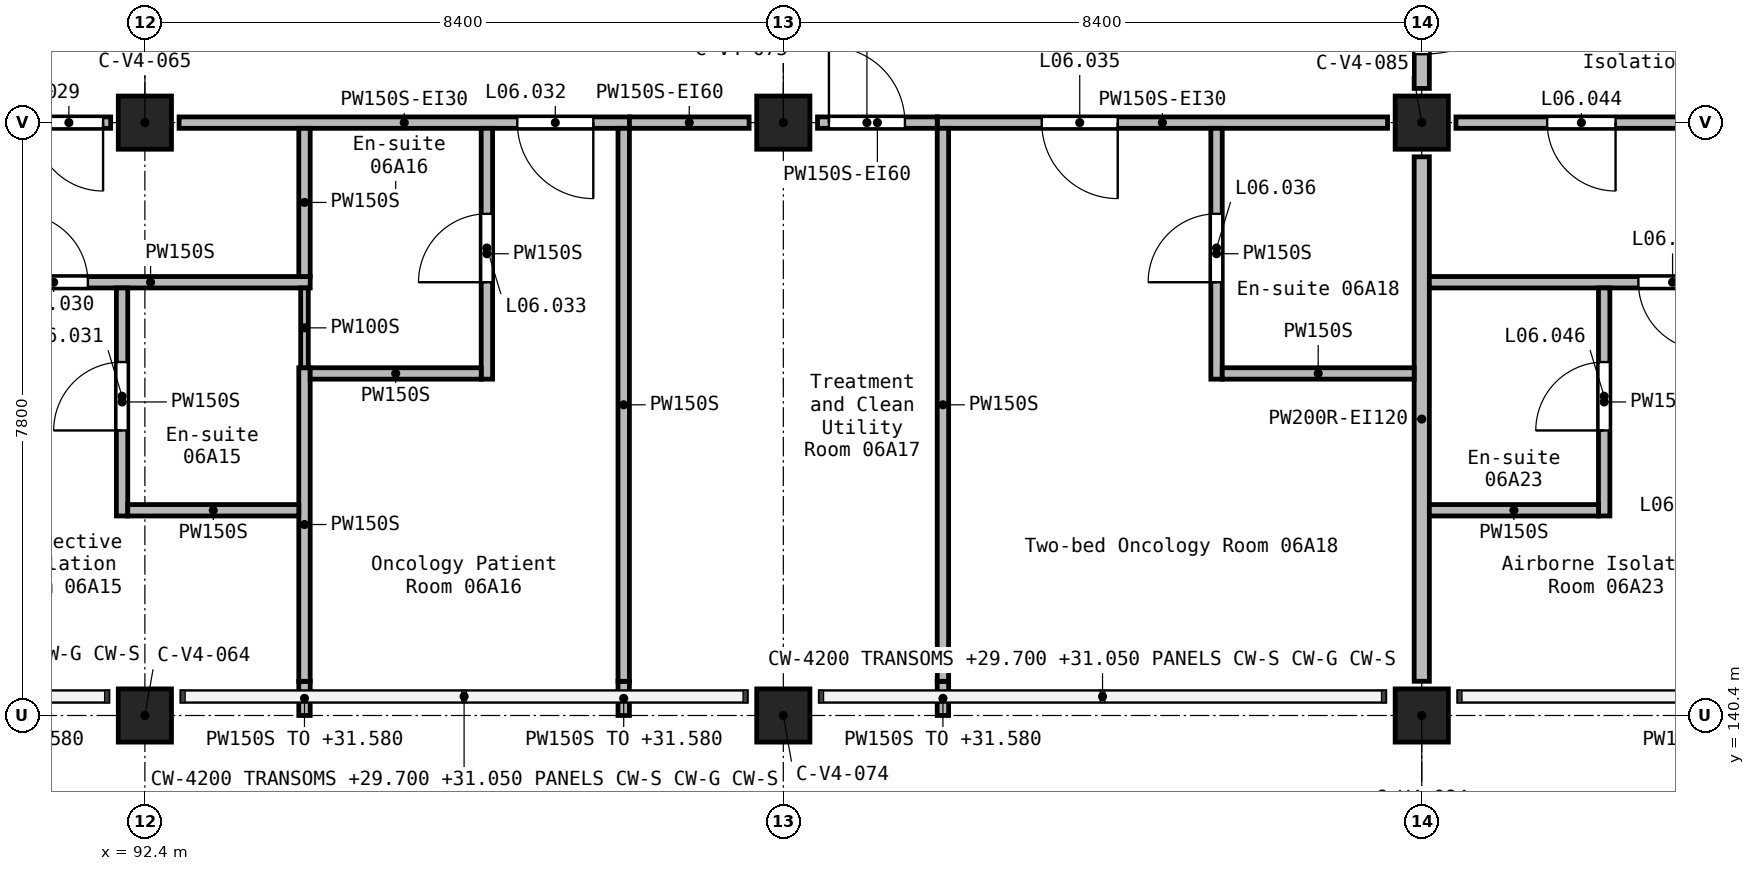
"""IFC4 building model, lengths in metres.
Left out: names, types, materials, properties, quantities, classifications, styles, units other than length and angle.
Written with IfcOpenShell. Run it as: python <this file> out.ifc"""

import sys

from ifc_helpers import new_model, si_unit, direction, frame, frame_2d, origin, origin_2d, place, context, subcontext, project, spatial, rectangle, extrude, element, fill, save


model = new_model("IFC4")
c1 = context("Model", 3, precision=1e-05, world=origin(), true_north=direction((0.0, 1.0)))
c2 = subcontext(c1, "Body", "Model", "MODEL_VIEW")
j1 = project(units=[si_unit("LENGTHUNIT", "METRE"), si_unit("PLANEANGLEUNIT", "RADIAN")], contexts=[c1])
p1 = place(None, origin())
s1 = spatial("IfcSite", under=j1, at=p1, CompositionType="ELEMENT")
p2 = place(p1, origin())
s2 = spatial("IfcBuilding", under=s1, at=p2, CompositionType="ELEMENT")
p3 = place(p2, frame((0.0, 0.0, 28.8)))
s3 = spatial("IfcBuildingStorey", under=s2, at=p3, CompositionType="ELEMENT", Elevation=28.8)
for number, where, z_axis, x_axis in (
    (1, (92.4, 140.4, 0.0), (0.0, 0.0, 1.0), (1.0, 0.0, 0.0)),
    (2, (92.4, 148.2, 0.0), (0.0, 0.0, 1.0), (1.0, 0.0, 0.0)),
    (3, (100.8, 140.4, 0.0), (0.0, 0.0, 1.0), (1.0, 0.0, 0.0)),
    (4, (100.8, 148.2, 0.0), (0.0, 0.0, 1.0), (1.0, 0.0, 0.0)),
    (5, (109.2, 140.4, 0.0), (0.0, 0.0, 1.0), (1.0, 0.0, 0.0)),
    (6, (109.2, 148.2, 0.0), (0.0, 0.0, 1.0), (1.0, 0.0, 0.0)),
):
    element("IfcColumn", number, at=place(p3, frame(where, z_axis=z_axis, x_axis=x_axis)), inside=s3, PredefinedType="COLUMN", context=c2, shape_type="SweptSolid", body=[
        extrude(rectangle(XDim=0.7, YDim=0.7, at=origin_2d()), origin(), (0.0, 0.0, 1.0), 3.9),
    ])
p4 = place(p3, frame((109.2, 151.35, 0.0), z_axis=(0.0, 0.0, 1.0), x_axis=(0.0, -1.0, 0.0)))
e7 = element("IfcWall", 7, at=p4, inside=s3, PredefinedType="SOLIDWALL", context=c2, shape_type="SweptSolid", body=[
    extrude(rectangle(XDim=2.7, YDim=0.2, at=frame_2d((1.35, 0.0))), origin(), (0.0, 0.0, 1.0), 3.6),
])
p5 = place(p4, frame((0.45, 0.0, 0.0)))
e8 = element("IfcOpeningElement", 8, at=p5, cuts=e7, PredefinedType="OPENING", context=c2, shape_type="SweptSolid", body=[
    extrude(rectangle(XDim=1.8, YDim=2.1, at=frame_2d((0.9, 1.05))), frame((0.0, 0.11, 0.0), z_axis=(0.0, -1.0, 0.0), x_axis=(1.0, 0.0, 0.0)), (0.0, 0.0, 1.0), 0.22),
])
p6 = place(p3, frame((109.2, 147.75, 0.0), z_axis=(0.0, 0.0, 1.0), x_axis=(0.0, -1.0, 0.0)))
e9 = element("IfcWall", 9, at=p6, inside=s3, PredefinedType="SOLIDWALL", context=c2, shape_type="SweptSolid", body=[
    extrude(rectangle(XDim=6.9, YDim=0.2, at=frame_2d((3.45, 0.0))), origin(), (0.0, 0.0, 1.0), 3.6),
])
p7 = place(p3, frame((117.15, 148.2, 0.0), z_axis=(0.0, 0.0, 1.0), x_axis=(-1.0, 0.0, 0.0)))
e10 = element("IfcWall", 10, at=p7, inside=s3, PredefinedType="PARTITIONING", context=c2, shape_type="SweptSolid", body=[
    extrude(rectangle(XDim=7.5, YDim=0.15, at=frame_2d((3.75, 0.0))), origin(), (0.0, 0.0, 1.0), 3.6),
])
p8 = place(p7, frame((5.4, 0.0, 0.0)))
e11 = element("IfcOpeningElement", 11, at=p8, cuts=e10, PredefinedType="OPENING", context=c2, shape_type="SweptSolid", body=[
    extrude(rectangle(XDim=0.9, YDim=2.1, at=frame_2d((0.45, 1.05))), frame((0.0, 0.085, 0.0), z_axis=(0.0, -1.0, 0.0), x_axis=(1.0, 0.0, 0.0)), (0.0, 0.0, 1.0), 0.17),
])
p9 = place(p7, frame((1.2, 0.0, 0.0)))
e12 = element("IfcOpeningElement", 12, at=p9, cuts=e10, PredefinedType="OPENING", context=c2, shape_type="SweptSolid", body=[
    extrude(rectangle(XDim=0.9, YDim=2.1, at=frame_2d((0.45, 1.05))), frame((0.0, 0.085, 0.0), z_axis=(0.0, -1.0, 0.0), x_axis=(1.0, 0.0, 0.0)), (0.0, 0.0, 1.0), 0.17),
])
p10 = place(p3, frame((108.75, 148.2, 0.0), z_axis=(0.0, 0.0, 1.0), x_axis=(-1.0, 0.0, 0.0)))
e13 = element("IfcWall", 13, at=p10, inside=s3, PredefinedType="PARTITIONING", context=c2, shape_type="SweptSolid", body=[
    extrude(rectangle(XDim=5.925, YDim=0.15, at=frame_2d((2.962, 0.0))), origin(), (0.0, 0.0, 1.0), 3.6),
])
p11 = place(p10, frame((3.55, 0.0, 0.0)))
e14 = element("IfcOpeningElement", 14, at=p11, cuts=e13, PredefinedType="OPENING", context=c2, shape_type="SweptSolid", body=[
    extrude(rectangle(XDim=1.0, YDim=2.1, at=frame_2d((0.5, 1.05))), frame((0.0, 0.085, 0.0), z_axis=(0.0, -1.0, 0.0), x_axis=(1.0, 0.0, 0.0)), (0.0, 0.0, 1.0), 0.17),
])
p12 = place(p3, frame((98.775, 148.2, 0.0), z_axis=(0.0, 0.0, 1.0), x_axis=(-1.0, 0.0, 0.0)))
e15 = element("IfcWall", 15, at=p12, inside=s3, PredefinedType="PARTITIONING", context=c2, shape_type="SweptSolid", body=[
    extrude(rectangle(XDim=5.925, YDim=0.15, at=frame_2d((2.962, 0.0))), origin(), (0.0, 0.0, 1.0), 3.6),
])
p13 = place(p12, frame((0.475, 0.0, 0.0)))
e16 = element("IfcOpeningElement", 16, at=p13, cuts=e15, PredefinedType="OPENING", context=c2, shape_type="SweptSolid", body=[
    extrude(rectangle(XDim=1.0, YDim=2.1, at=frame_2d((0.5, 1.05))), frame((0.0, 0.085, 0.0), z_axis=(0.0, -1.0, 0.0), x_axis=(1.0, 0.0, 0.0)), (0.0, 0.0, 1.0), 0.17),
])
p14 = place(p3, frame((91.95, 148.2, 0.0), z_axis=(0.0, 0.0, 1.0), x_axis=(-1.0, 0.0, 0.0)))
e17 = element("IfcWall", 17, at=p14, inside=s3, PredefinedType="PARTITIONING", context=c2, shape_type="SweptSolid", body=[
    extrude(rectangle(XDim=7.5, YDim=0.15, at=frame_2d((3.75, 0.0))), origin(), (0.0, 0.0, 1.0), 3.6),
])
p15 = place(p14, frame((3.9, 0.0, 0.0)))
e18 = element("IfcOpeningElement", 18, at=p15, cuts=e17, PredefinedType="OPENING", context=c2, shape_type="SweptSolid", body=[
    extrude(rectangle(XDim=1.8, YDim=2.1, at=frame_2d((0.9, 1.05))), frame((0.0, 0.085, 0.0), z_axis=(0.0, -1.0, 0.0), x_axis=(1.0, 0.0, 0.0)), (0.0, 0.0, 1.0), 0.17),
])
p16 = place(p14, frame((0.1, 0.0, 0.0)))
e19 = element("IfcOpeningElement", 19, at=p16, cuts=e17, PredefinedType="OPENING", context=c2, shape_type="SweptSolid", body=[
    extrude(rectangle(XDim=0.9, YDim=2.1, at=frame_2d((0.45, 1.05))), frame((0.0, 0.085, 0.0), z_axis=(0.0, -1.0, 0.0), x_axis=(1.0, 0.0, 0.0)), (0.0, 0.0, 1.0), 0.17),
])
p17 = place(p3, frame((98.775, 148.2, 0.0), z_axis=(0.0, 0.0, 1.0), x_axis=(1.0, 0.0, 0.0)))
e20 = element("IfcWall", 20, at=p17, inside=s3, PredefinedType="PARTITIONING", context=c2, shape_type="SweptSolid", body=[
    extrude(rectangle(XDim=1.575, YDim=0.15, at=frame_2d((0.788, 0.0))), origin(), (0.0, 0.0, 1.0), 3.6),
])
p18 = place(p3, frame((101.25, 148.2, 0.0), z_axis=(0.0, 0.0, 1.0), x_axis=(1.0, 0.0, 0.0)))
e21 = element("IfcWall", 21, at=p18, inside=s3, PredefinedType="PARTITIONING", context=c2, shape_type="SweptSolid", body=[
    extrude(rectangle(XDim=1.575, YDim=0.15, at=frame_2d((0.788, 0.0))), origin(), (0.0, 0.0, 1.0), 3.6),
])
p19 = place(p18, frame((0.15, 0.0, 0.0)))
e22 = element("IfcOpeningElement", 22, at=p19, cuts=e21, PredefinedType="OPENING", context=c2, shape_type="SweptSolid", body=[
    extrude(rectangle(XDim=1.0, YDim=2.1, at=frame_2d((0.5, 1.05))), frame((0.0, 0.085, 0.0), z_axis=(0.0, -1.0, 0.0), x_axis=(1.0, 0.0, 0.0)), (0.0, 0.0, 1.0), 0.17),
])
p20 = place(p3, frame((117.675, 146.1, 0.0), z_axis=(0.0, 0.0, 1.0), x_axis=(-1.0, 0.0, 0.0)))
e23 = element("IfcWall", 23, at=p20, inside=s3, PredefinedType="PARTITIONING", context=c2, shape_type="SweptSolid", body=[
    extrude(rectangle(XDim=8.375, YDim=0.15, at=frame_2d((4.188, 0.0))), origin(), (0.0, 0.0, 1.0), 3.6),
])
p21 = place(p20, frame((4.725, 0.0, 0.0)))
e24 = element("IfcOpeningElement", 24, at=p21, cuts=e23, PredefinedType="OPENING", context=c2, shape_type="SweptSolid", body=[
    extrude(rectangle(XDim=0.9, YDim=2.1, at=frame_2d((0.45, 1.05))), frame((0.0, 0.085, 0.0), z_axis=(0.0, -1.0, 0.0), x_axis=(1.0, 0.0, 0.0)), (0.0, 0.0, 1.0), 0.17),
])
p22 = place(p20, frame((2.925, 0.0, 0.0)))
e25 = element("IfcOpeningElement", 25, at=p22, cuts=e23, PredefinedType="OPENING", context=c2, shape_type="SweptSolid", body=[
    extrude(rectangle(XDim=0.9, YDim=2.1, at=frame_2d((0.45, 1.05))), frame((0.0, 0.085, 0.0), z_axis=(0.0, -1.0, 0.0), x_axis=(1.0, 0.0, 0.0)), (0.0, 0.0, 1.0), 0.17),
])
p23 = place(p3, frame((98.7, 140.4, 0.0), z_axis=(0.0, 0.0, 1.0), x_axis=(0.0, 1.0, 0.0)))
e26 = element("IfcWall", 26, at=p23, inside=s3, PredefinedType="PARTITIONING", context=c2, shape_type="SweptSolid", body=[
    extrude(rectangle(XDim=0.45, YDim=0.15, at=frame_2d((0.225, 0.0))), origin(), (0.0, 0.0, 1.0), 2.78),
])
p24 = place(p3, frame((98.7, 140.85, 0.0), z_axis=(0.0, 0.0, 1.0), x_axis=(0.0, 1.0, 0.0)))
e27 = element("IfcWall", 27, at=p24, inside=s3, PredefinedType="PARTITIONING", context=c2, shape_type="SweptSolid", body=[
    extrude(rectangle(XDim=7.275, YDim=0.15, at=frame_2d((3.637, 0.0))), origin(), (0.0, 0.0, 1.0), 3.6),
])
p25 = place(p3, frame((102.9, 140.4, 0.0), z_axis=(0.0, 0.0, 1.0), x_axis=(0.0, 1.0, 0.0)))
e28 = element("IfcWall", 28, at=p25, inside=s3, PredefinedType="PARTITIONING", context=c2, shape_type="SweptSolid", body=[
    extrude(rectangle(XDim=0.45, YDim=0.15, at=frame_2d((0.225, 0.0))), origin(), (0.0, 0.0, 1.0), 2.78),
])
p26 = place(p3, frame((102.9, 140.85, 0.0), z_axis=(0.0, 0.0, 1.0), x_axis=(0.0, 1.0, 0.0)))
e29 = element("IfcWall", 29, at=p26, inside=s3, PredefinedType="PARTITIONING", context=c2, shape_type="SweptSolid", body=[
    extrude(rectangle(XDim=7.275, YDim=0.15, at=frame_2d((3.637, 0.0))), origin(), (0.0, 0.0, 1.0), 3.6),
])
p27 = place(p3, frame((94.5, 140.4, 0.0), z_axis=(0.0, 0.0, 1.0), x_axis=(0.0, 1.0, 0.0)))
e30 = element("IfcWall", 30, at=p27, inside=s3, PredefinedType="PARTITIONING", context=c2, shape_type="SweptSolid", body=[
    extrude(rectangle(XDim=0.45, YDim=0.15, at=frame_2d((0.225, 0.0))), origin(), (0.0, 0.0, 1.0), 2.78),
])
p28 = place(p3, frame((94.5, 140.85, 0.0), z_axis=(0.0, 0.0, 1.0), x_axis=(0.0, 1.0, 0.0)))
e31 = element("IfcWall", 31, at=p28, inside=s3, PredefinedType="PARTITIONING", context=c2, shape_type="SweptSolid", body=[
    extrude(rectangle(XDim=4.125, YDim=0.15, at=frame_2d((2.062, 0.0))), origin(), (0.0, 0.0, 1.0), 3.6),
])
p29 = place(p3, frame((90.375, 146.1, 0.0), z_axis=(0.0, 0.0, 1.0), x_axis=(1.0, 0.0, 0.0)))
e32 = element("IfcWall", 32, at=p29, inside=s3, PredefinedType="PARTITIONING", context=c2, shape_type="SweptSolid", body=[
    extrude(rectangle(XDim=4.2, YDim=0.15, at=frame_2d((2.1, 0.0))), origin(), (0.0, 0.0, 1.0), 3.6),
])
p30 = place(p29, frame((0.375, 0.0, 0.0)))
e33 = element("IfcOpeningElement", 33, at=p30, cuts=e32, PredefinedType="OPENING", context=c2, shape_type="SweptSolid", body=[
    extrude(rectangle(XDim=0.9, YDim=2.1, at=frame_2d((0.45, 1.05))), frame((0.0, 0.085, 0.0), z_axis=(0.0, -1.0, 0.0), x_axis=(1.0, 0.0, 0.0)), (0.0, 0.0, 1.0), 0.17),
])
p31 = place(p3, frame((96.9, 144.825, 0.0), z_axis=(0.0, 0.0, 1.0), x_axis=(0.0, 1.0, 0.0)))
e34 = element("IfcWall", 34, at=p31, inside=s3, PredefinedType="PARTITIONING", context=c2, shape_type="SweptSolid", body=[
    extrude(rectangle(XDim=3.3, YDim=0.15, at=frame_2d((1.65, 0.0))), origin(), (0.0, 0.0, 1.0), 3.6),
])
p32 = place(p31, frame((1.275, 0.0, 0.0)))
e35 = element("IfcOpeningElement", 35, at=p32, cuts=e34, PredefinedType="OPENING", context=c2, shape_type="SweptSolid", body=[
    extrude(rectangle(XDim=0.9, YDim=2.1, at=frame_2d((0.45, 1.05))), frame((0.0, 0.085, 0.0), z_axis=(0.0, -1.0, 0.0), x_axis=(1.0, 0.0, 0.0)), (0.0, 0.0, 1.0), 0.17),
])
p33 = place(p3, frame((106.5, 144.825, 0.0), z_axis=(0.0, 0.0, 1.0), x_axis=(0.0, 1.0, 0.0)))
e36 = element("IfcWall", 36, at=p33, inside=s3, PredefinedType="PARTITIONING", context=c2, shape_type="SweptSolid", body=[
    extrude(rectangle(XDim=3.3, YDim=0.15, at=frame_2d((1.65, 0.0))), origin(), (0.0, 0.0, 1.0), 3.6),
])
p34 = place(p33, frame((1.275, 0.0, 0.0)))
e37 = element("IfcOpeningElement", 37, at=p34, cuts=e36, PredefinedType="OPENING", context=c2, shape_type="SweptSolid", body=[
    extrude(rectangle(XDim=0.9, YDim=2.1, at=frame_2d((0.45, 1.05))), frame((0.0, 0.085, 0.0), z_axis=(0.0, -1.0, 0.0), x_axis=(1.0, 0.0, 0.0)), (0.0, 0.0, 1.0), 0.17),
])
p35 = place(p3, frame((92.1, 143.025, 0.0), z_axis=(0.0, 0.0, 1.0), x_axis=(0.0, 1.0, 0.0)))
e38 = element("IfcWall", 38, at=p35, inside=s3, PredefinedType="PARTITIONING", context=c2, shape_type="SweptSolid", body=[
    extrude(rectangle(XDim=3.0, YDim=0.15, at=frame_2d((1.5, 0.0))), origin(), (0.0, 0.0, 1.0), 3.6),
])
p36 = place(p35, frame((1.125, 0.0, 0.0)))
e39 = element("IfcOpeningElement", 39, at=p36, cuts=e38, PredefinedType="OPENING", context=c2, shape_type="SweptSolid", body=[
    extrude(rectangle(XDim=0.9, YDim=2.1, at=frame_2d((0.45, 1.05))), frame((0.0, 0.085, 0.0), z_axis=(0.0, -1.0, 0.0), x_axis=(1.0, 0.0, 0.0)), (0.0, 0.0, 1.0), 0.17),
])
p37 = place(p3, frame((111.6, 143.025, 0.0), z_axis=(0.0, 0.0, 1.0), x_axis=(0.0, 1.0, 0.0)))
e40 = element("IfcWall", 40, at=p37, inside=s3, PredefinedType="PARTITIONING", context=c2, shape_type="SweptSolid", body=[
    extrude(rectangle(XDim=3.0, YDim=0.15, at=frame_2d((1.5, 0.0))), origin(), (0.0, 0.0, 1.0), 3.6),
])
p38 = place(p37, frame((1.125, 0.0, 0.0)))
e41 = element("IfcOpeningElement", 41, at=p38, cuts=e40, PredefinedType="OPENING", context=c2, shape_type="SweptSolid", body=[
    extrude(rectangle(XDim=0.9, YDim=2.1, at=frame_2d((0.45, 1.05))), frame((0.0, 0.085, 0.0), z_axis=(0.0, -1.0, 0.0), x_axis=(1.0, 0.0, 0.0)), (0.0, 0.0, 1.0), 0.17),
])
p39 = place(p3, frame((106.575, 144.9, 0.0), z_axis=(0.0, 0.0, 1.0), x_axis=(1.0, 0.0, 0.0)))
e42 = element("IfcWall", 42, at=p39, inside=s3, PredefinedType="PARTITIONING", context=c2, shape_type="SweptSolid", body=[
    extrude(rectangle(XDim=2.525, YDim=0.15, at=frame_2d((1.263, 0.0))), origin(), (0.0, 0.0, 1.0), 3.6),
])
for number, where, z_axis, x_axis in (
    (43, (92.175, 143.1, 0.0), (0.0, 0.0, 1.0), (1.0, 0.0, 0.0)),
    (44, (94.575, 144.9, 0.0), (0.0, 0.0, 1.0), (1.0, 0.0, 0.0)),
):
    element("IfcWall", number, at=place(p3, frame(where, z_axis=z_axis, x_axis=x_axis)), inside=s3, PredefinedType="PARTITIONING", context=c2, shape_type="SweptSolid", body=[
        extrude(rectangle(XDim=2.25, YDim=0.15, at=frame_2d((1.125, 0.0))), origin(), (0.0, 0.0, 1.0), 3.6),
    ])
p40 = place(p3, frame((109.3, 143.1, 0.0), z_axis=(0.0, 0.0, 1.0), x_axis=(1.0, 0.0, 0.0)))
e45 = element("IfcWall", 45, at=p40, inside=s3, PredefinedType="PARTITIONING", context=c2, shape_type="SweptSolid", body=[
    extrude(rectangle(XDim=2.225, YDim=0.15, at=frame_2d((1.112, 0.0))), origin(), (0.0, 0.0, 1.0), 3.6),
])
p41 = place(p3, frame((94.5, 146.175, 0.0), z_axis=(0.0, 0.0, 1.0), x_axis=(0.0, 1.0, 0.0)))
e46 = element("IfcWall", 46, at=p41, inside=s3, PredefinedType="PARTITIONING", context=c2, shape_type="SweptSolid", body=[
    extrude(rectangle(XDim=1.95, YDim=0.15, at=frame_2d((0.975, 0.0))), origin(), (0.0, 0.0, 1.0), 3.6),
])
p42 = place(p3, frame((94.5, 144.975, 0.0), z_axis=(0.0, 0.0, 1.0), x_axis=(0.0, 1.0, 0.0)))
e47 = element("IfcWall", 47, at=p42, inside=s3, PredefinedType="PARTITIONING", context=c2, shape_type="SweptSolid", body=[
    extrude(rectangle(XDim=1.05, YDim=0.1, at=frame_2d((0.525, 0.0))), origin(), (0.0, 0.0, 1.0), 3.6),
])
p43 = place(p5, origin())
e48 = element("IfcDoor", 48, at=p43, inside=s3, OperationType="DOUBLE_DOOR_SINGLE_SWING", PredefinedType="DOOR", context=c2, shape_type="SweptSolid", body=[
    extrude(rectangle(XDim=1.8, YDim=2.1, at=frame_2d((0.9, 1.05))), frame((0.0, 0.025, 0.0), z_axis=(0.0, -1.0, 0.0), x_axis=(1.0, 0.0, 0.0)), (0.0, 0.0, 1.0), 0.05),
])
fill(e8, e48)
p44 = place(p16, origin())
e49 = element("IfcDoor", 49, at=p44, inside=s3, OperationType="SINGLE_SWING_LEFT", PredefinedType="DOOR", context=c2, shape_type="SweptSolid", body=[
    extrude(rectangle(XDim=0.9, YDim=2.1, at=frame_2d((0.45, 1.05))), frame((0.0, 0.025, 0.0), z_axis=(0.0, -1.0, 0.0), x_axis=(1.0, 0.0, 0.0)), (0.0, 0.0, 1.0), 0.05),
])
fill(e19, e49)
p45 = place(p30, frame((0.9, 0.0, 0.0), z_axis=(0.0, 0.0, 1.0), x_axis=(-1.0, 0.0, 0.0)))
e50 = element("IfcDoor", 50, at=p45, inside=s3, OperationType="SINGLE_SWING_RIGHT", PredefinedType="DOOR", context=c2, shape_type="SweptSolid", body=[
    extrude(rectangle(XDim=0.9, YDim=2.1, at=frame_2d((0.45, 1.05))), frame((0.0, 0.025, 0.0), z_axis=(0.0, -1.0, 0.0), x_axis=(1.0, 0.0, 0.0)), (0.0, 0.0, 1.0), 0.05),
])
fill(e33, e50)
p46 = place(p36, frame((0.9, 0.0, 0.0), z_axis=(0.0, 0.0, 1.0), x_axis=(-1.0, 0.0, 0.0)))
e51 = element("IfcDoor", 51, at=p46, inside=s3, OperationType="SINGLE_SWING_LEFT", PredefinedType="DOOR", context=c2, shape_type="SweptSolid", body=[
    extrude(rectangle(XDim=0.9, YDim=2.1, at=frame_2d((0.45, 1.05))), frame((0.0, 0.025, 0.0), z_axis=(0.0, -1.0, 0.0), x_axis=(1.0, 0.0, 0.0)), (0.0, 0.0, 1.0), 0.05),
])
fill(e39, e51)
p47 = place(p13, origin())
e52 = element("IfcDoor", 52, at=p47, inside=s3, OperationType="SINGLE_SWING_LEFT", PredefinedType="DOOR", context=c2, shape_type="SweptSolid", body=[
    extrude(rectangle(XDim=1.0, YDim=2.1, at=frame_2d((0.5, 1.05))), frame((0.0, 0.025, 0.0), z_axis=(0.0, -1.0, 0.0), x_axis=(1.0, 0.0, 0.0)), (0.0, 0.0, 1.0), 0.05),
])
fill(e16, e52)
p48 = place(p32, origin())
e53 = element("IfcDoor", 53, at=p48, inside=s3, OperationType="SINGLE_SWING_RIGHT", PredefinedType="DOOR", context=c2, shape_type="SweptSolid", body=[
    extrude(rectangle(XDim=0.9, YDim=2.1, at=frame_2d((0.45, 1.05))), frame((0.0, 0.025, 0.0), z_axis=(0.0, -1.0, 0.0), x_axis=(1.0, 0.0, 0.0)), (0.0, 0.0, 1.0), 0.05),
])
fill(e35, e53)
p49 = place(p19, frame((1.0, 0.0, 0.0), z_axis=(0.0, 0.0, 1.0), x_axis=(-1.0, 0.0, 0.0)))
e54 = element("IfcDoor", 54, at=p49, inside=s3, OperationType="SINGLE_SWING_RIGHT", PredefinedType="DOOR", context=c2, shape_type="SweptSolid", body=[
    extrude(rectangle(XDim=1.0, YDim=2.1, at=frame_2d((0.5, 1.05))), frame((0.0, 0.025, 0.0), z_axis=(0.0, -1.0, 0.0), x_axis=(1.0, 0.0, 0.0)), (0.0, 0.0, 1.0), 0.05),
])
fill(e22, e54)
p50 = place(p11, origin())
e55 = element("IfcDoor", 55, at=p50, inside=s3, OperationType="SINGLE_SWING_RIGHT", PredefinedType="DOOR", context=c2, shape_type="SweptSolid", body=[
    extrude(rectangle(XDim=1.0, YDim=2.1, at=frame_2d((0.5, 1.05))), frame((0.0, 0.025, 0.0), z_axis=(0.0, -1.0, 0.0), x_axis=(1.0, 0.0, 0.0)), (0.0, 0.0, 1.0), 0.05),
])
fill(e14, e55)
p51 = place(p34, frame((0.9, 0.0, 0.0), z_axis=(0.0, 0.0, 1.0), x_axis=(-1.0, 0.0, 0.0)))
e56 = element("IfcDoor", 56, at=p51, inside=s3, OperationType="SINGLE_SWING_LEFT", PredefinedType="DOOR", context=c2, shape_type="SweptSolid", body=[
    extrude(rectangle(XDim=0.9, YDim=2.1, at=frame_2d((0.45, 1.05))), frame((0.0, 0.025, 0.0), z_axis=(0.0, -1.0, 0.0), x_axis=(1.0, 0.0, 0.0)), (0.0, 0.0, 1.0), 0.05),
])
fill(e37, e56)
p52 = place(p8, origin())
e57 = element("IfcDoor", 57, at=p52, inside=s3, OperationType="SINGLE_SWING_RIGHT", PredefinedType="DOOR", context=c2, shape_type="SweptSolid", body=[
    extrude(rectangle(XDim=0.9, YDim=2.1, at=frame_2d((0.45, 1.05))), frame((0.0, 0.025, 0.0), z_axis=(0.0, -1.0, 0.0), x_axis=(1.0, 0.0, 0.0)), (0.0, 0.0, 1.0), 0.05),
])
fill(e11, e57)
p53 = place(p21, origin())
e58 = element("IfcDoor", 58, at=p53, inside=s3, OperationType="SINGLE_SWING_RIGHT", PredefinedType="DOOR", context=c2, shape_type="SweptSolid", body=[
    extrude(rectangle(XDim=0.9, YDim=2.1, at=frame_2d((0.45, 1.05))), frame((0.0, 0.025, 0.0), z_axis=(0.0, -1.0, 0.0), x_axis=(1.0, 0.0, 0.0)), (0.0, 0.0, 1.0), 0.05),
])
fill(e24, e58)
p54 = place(p38, origin())
e59 = element("IfcDoor", 59, at=p54, inside=s3, OperationType="SINGLE_SWING_RIGHT", PredefinedType="DOOR", context=c2, shape_type="SweptSolid", body=[
    extrude(rectangle(XDim=0.9, YDim=2.1, at=frame_2d((0.45, 1.05))), frame((0.0, 0.025, 0.0), z_axis=(0.0, -1.0, 0.0), x_axis=(1.0, 0.0, 0.0)), (0.0, 0.0, 1.0), 0.05),
])
fill(e41, e59)
save(model, sys.argv[1])
